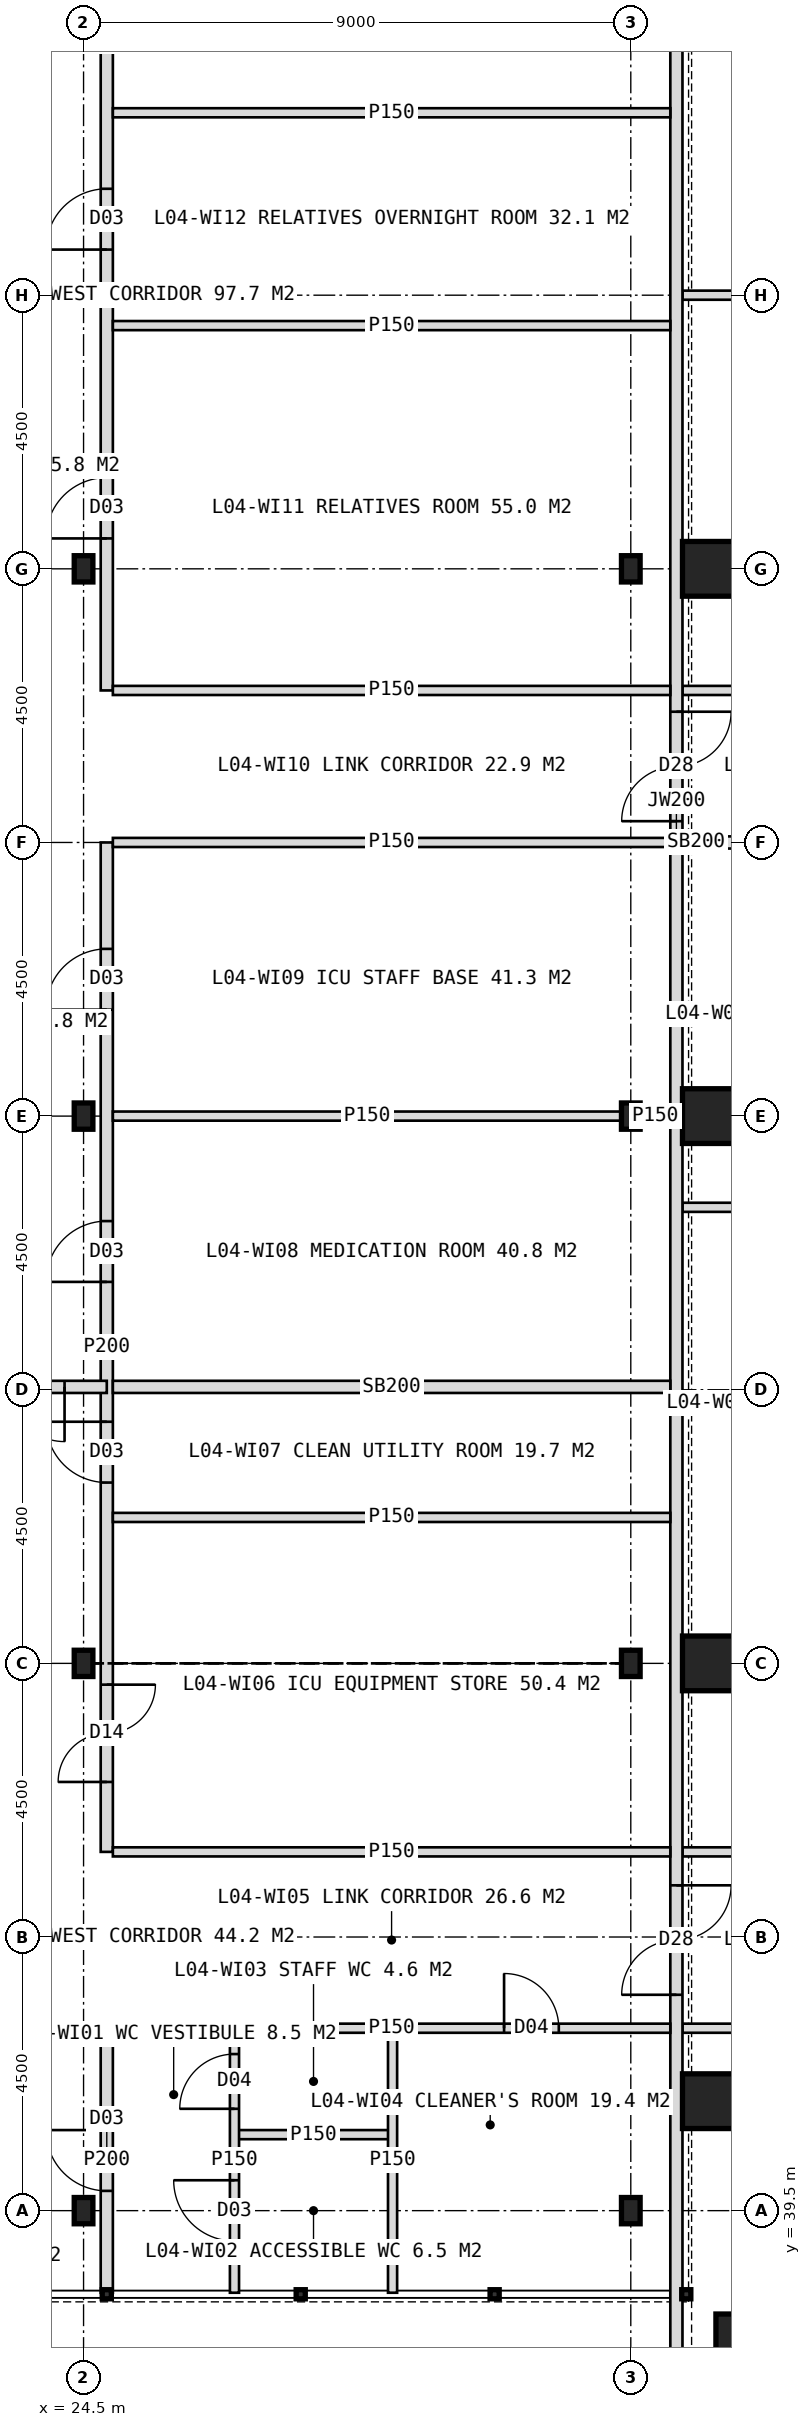
"""IFC4 building model, lengths in metres.
Left out: names, types, materials, properties, quantities, classifications, styles, units other than length and angle.
Written with IfcOpenShell. Run it as: python <this file> out.ifc"""

import sys

from ifc_helpers import new_model, si_unit, direction, frame, frame_2d, origin, origin_2d, place, context, subcontext, project, spatial, rectangle, hollow_rectangle, i_section, extrude, element, fill, save


model = new_model("IFC4")
c1 = context("Model", 3, precision=1e-05, world=origin(), true_north=direction((0.0, 1.0)))
c2 = subcontext(c1, "Body", "Model", "MODEL_VIEW")
j1 = project(units=[si_unit("LENGTHUNIT", "METRE"), si_unit("PLANEANGLEUNIT", "RADIAN")], contexts=[c1])
p1 = place(None, origin())
s1 = spatial("IfcSite", under=j1, at=p1, CompositionType="ELEMENT")
p2 = place(p1, origin())
s2 = spatial("IfcBuilding", under=s1, at=p2, CompositionType="ELEMENT")
p3 = place(p2, frame((0.0, 0.0, 21.0)))
s3 = spatial("IfcBuildingStorey", under=s2, at=p3, CompositionType="ELEMENT", Elevation=21.0)
for number, where, z_axis, x_axis in (
    (1, (34.8, 41.3, 0.0), (0.0, 0.0, 1.0), (1.0, 0.0, 0.0)),
    (2, (34.8, 48.5, 0.0), (0.0, 0.0, 1.0), (1.0, 0.0, 0.0)),
    (3, (34.8, 57.5, 0.0), (0.0, 0.0, 1.0), (1.0, 0.0, 0.0)),
    (4, (34.8, 66.5, 0.0), (0.0, 0.0, 1.0), (1.0, 0.0, 0.0)),
    (5, (35.35, 37.35, 0.0), (0.0, 0.0, 1.0), (1.0, 0.0, 0.0)),
):
    element("IfcColumn", number, at=place(p3, frame(where, z_axis=z_axis, x_axis=x_axis)), inside=s3, PredefinedType="COLUMN", context=c2, shape_type="SweptSolid", body=[
        extrude(hollow_rectangle(XDim=0.9, YDim=0.9, WallThickness=0.08, at=origin_2d()), origin(), (0.0, 0.0, 1.0), 5.0),
    ])
for number, where, z_axis, x_axis in (
    (6, (24.5, 39.5, 0.0), (0.0, 0.0, 1.0), (1.0, 0.0, 0.0)),
    (7, (24.5, 48.5, 0.0), (0.0, 0.0, 1.0), (1.0, 0.0, 0.0)),
    (8, (24.5, 57.5, 0.0), (0.0, 0.0, 1.0), (1.0, 0.0, 0.0)),
    (9, (24.5, 66.5, 0.0), (0.0, 0.0, 1.0), (1.0, 0.0, 0.0)),
    (10, (33.5, 39.5, 0.0), (0.0, 0.0, 1.0), (1.0, 0.0, 0.0)),
    (11, (33.5, 48.5, 0.0), (0.0, 0.0, 1.0), (1.0, 0.0, 0.0)),
    (12, (33.5, 57.5, 0.0), (0.0, 0.0, 1.0), (1.0, 0.0, 0.0)),
    (13, (33.5, 66.5, 0.0), (0.0, 0.0, 1.0), (1.0, 0.0, 0.0)),
):
    element("IfcColumn", number, at=place(p3, frame(where, z_axis=z_axis, x_axis=x_axis)), inside=s3, PredefinedType="COLUMN", context=c2, shape_type="SweptSolid", body=[
        extrude(i_section(OverallWidth=0.307, OverallDepth=0.432, WebThickness=0.021, FlangeThickness=0.04, FilletRadius=0.027, at=origin_2d()), origin(), (0.0, 0.0, 1.0), 5.0),
    ])
for number, where, z_axis, x_axis in (
    (14, (40.5, 42.5, 0.0), (0.0, 0.0, 1.0), (-1.0, 0.0, 0.0)),
    (15, (40.5, 45.4, 0.0), (0.0, 0.0, 1.0), (-1.0, 0.0, 0.0)),
    (16, (40.5, 56.0, 0.0), (0.0, 0.0, 1.0), (-1.0, 0.0, 0.0)),
):
    element("IfcWall", number, at=place(p3, frame(where, z_axis=z_axis, x_axis=x_axis)), inside=s3, PredefinedType="PARTITIONING", context=c2, shape_type="SweptSolid", body=[
        extrude(rectangle(XDim=6.15, YDim=0.15, at=frame_2d((3.075, 0.0))), origin(), (0.0, 0.0, 1.0), 4.7),
    ])
p4 = place(p3, frame((40.5, 62.0, 0.0), z_axis=(0.0, 0.0, 1.0), x_axis=(-1.0, 0.0, 0.0)))
e17 = element("IfcWall", 17, at=p4, inside=s3, PredefinedType="SOLIDWALL", context=c2, shape_type="SweptSolid", body=[
    extrude(rectangle(XDim=5.7, YDim=0.2, at=frame_2d((2.85, 0.0))), origin(), (0.0, 0.0, 1.0), 3.7),
])
p5 = place(p3, frame((34.8, 62.0, 0.0), z_axis=(0.0, 0.0, 1.0), x_axis=(-1.0, 0.0, 0.0)))
e18 = element("IfcWall", 18, at=p5, inside=s3, PredefinedType="SOLIDWALL", context=c2, shape_type="SweptSolid", body=[
    extrude(rectangle(XDim=0.45, YDim=0.2, at=frame_2d((0.225, 0.0))), origin(), (0.0, 0.0, 1.0), 4.7),
])
for number, where, z_axis, x_axis in (
    (19, (40.5, 64.5, 0.0), (0.0, 0.0, 1.0), (-1.0, 0.0, 0.0)),
    (20, (40.5, 71.0, 0.0), (0.0, 0.0, 1.0), (-1.0, 0.0, 0.0)),
):
    element("IfcWall", number, at=place(p3, frame(where, z_axis=z_axis, x_axis=x_axis)), inside=s3, PredefinedType="PARTITIONING", context=c2, shape_type="SweptSolid", body=[
        extrude(rectangle(XDim=6.15, YDim=0.15, at=frame_2d((3.075, 0.0))), origin(), (0.0, 0.0, 1.0), 4.7),
    ])
p6 = place(p3, frame((24.882, 38.15, 0.0), z_axis=(0.0, 0.0, 1.0), x_axis=(0.0, 1.0, 0.0)))
e21 = element("IfcWall", 21, at=p6, inside=s3, PredefinedType="PARTITIONING", context=c2, shape_type="SweptSolid", body=[
    extrude(rectangle(XDim=4.35, YDim=0.2, at=frame_2d((2.175, 0.0))), origin(), (0.0, 0.0, 1.0), 4.7),
])
p7 = place(p6, frame((1.675, 0.0, 0.0)))
e22 = element("IfcOpeningElement", 22, at=p7, cuts=e21, PredefinedType="OPENING", context=c2, shape_type="SweptSolid", body=[
    extrude(rectangle(XDim=1.0, YDim=2.1, at=frame_2d((0.5, 1.05))), frame((0.0, 0.11, 0.0), z_axis=(0.0, -1.0, 0.0), x_axis=(1.0, 0.0, 0.0)), (0.0, 0.0, 1.0), 0.22),
])
p8 = place(p3, frame((24.882, 45.4, 0.0), z_axis=(0.0, 0.0, 1.0), x_axis=(0.0, 1.0, 0.0)))
e23 = element("IfcWall", 23, at=p8, inside=s3, PredefinedType="PARTITIONING", context=c2, shape_type="SweptSolid", body=[
    extrude(rectangle(XDim=16.6, YDim=0.2, at=frame_2d((8.3, 0.0))), origin(), (0.0, 0.0, 1.0), 4.7),
])
p9 = place(p8, frame((1.15, 0.0, 0.0)))
e24 = element("IfcOpeningElement", 24, at=p9, cuts=e23, PredefinedType="OPENING", context=c2, shape_type="SweptSolid", body=[
    extrude(rectangle(XDim=1.6, YDim=2.2, at=frame_2d((0.8, 1.1))), frame((0.0, 0.11, 0.0), z_axis=(0.0, -1.0, 0.0), x_axis=(1.0, 0.0, 0.0)), (0.0, 0.0, 1.0), 0.22),
])
p10 = place(p8, frame((6.073, 0.0, 0.0)))
e25 = element("IfcOpeningElement", 25, at=p10, cuts=e23, PredefinedType="OPENING", context=c2, shape_type="SweptSolid", body=[
    extrude(rectangle(XDim=1.0, YDim=2.1, at=frame_2d((0.5, 1.05))), frame((0.0, 0.11, 0.0), z_axis=(0.0, -1.0, 0.0), x_axis=(1.0, 0.0, 0.0)), (0.0, 0.0, 1.0), 0.22),
])
p11 = place(p8, frame((9.374, 0.0, 0.0)))
e26 = element("IfcOpeningElement", 26, at=p11, cuts=e23, PredefinedType="OPENING", context=c2, shape_type="SweptSolid", body=[
    extrude(rectangle(XDim=1.0, YDim=2.1, at=frame_2d((0.5, 1.05))), frame((0.0, 0.11, 0.0), z_axis=(0.0, -1.0, 0.0), x_axis=(1.0, 0.0, 0.0)), (0.0, 0.0, 1.0), 0.22),
])
p12 = place(p8, frame((13.85, 0.0, 0.0)))
e27 = element("IfcOpeningElement", 27, at=p12, cuts=e23, PredefinedType="OPENING", context=c2, shape_type="SweptSolid", body=[
    extrude(rectangle(XDim=1.0, YDim=2.1, at=frame_2d((0.5, 1.05))), frame((0.0, 0.11, 0.0), z_axis=(0.0, -1.0, 0.0), x_axis=(1.0, 0.0, 0.0)), (0.0, 0.0, 1.0), 0.22),
])
p13 = place(p3, frame((24.882, 64.5, 0.0), z_axis=(0.0, 0.0, 1.0), x_axis=(0.0, 1.0, 0.0)))
e28 = element("IfcWall", 28, at=p13, inside=s3, PredefinedType="PARTITIONING", context=c2, shape_type="SweptSolid", body=[
    extrude(rectangle(XDim=21.35, YDim=0.2, at=frame_2d((10.675, 0.0))), origin(), (0.0, 0.0, 1.0), 4.7),
])
p14 = place(p13, frame((2.5, 0.0, 0.0)))
e29 = element("IfcOpeningElement", 29, at=p14, cuts=e28, PredefinedType="OPENING", context=c2, shape_type="SweptSolid", body=[
    extrude(rectangle(XDim=1.0, YDim=2.1, at=frame_2d((0.5, 1.05))), frame((0.0, 0.11, 0.0), z_axis=(0.0, -1.0, 0.0), x_axis=(1.0, 0.0, 0.0)), (0.0, 0.0, 1.0), 0.22),
])
p15 = place(p13, frame((7.25, 0.0, 0.0)))
e30 = element("IfcOpeningElement", 30, at=p15, cuts=e28, PredefinedType="OPENING", context=c2, shape_type="SweptSolid", body=[
    extrude(rectangle(XDim=1.0, YDim=2.1, at=frame_2d((0.5, 1.05))), frame((0.0, 0.11, 0.0), z_axis=(0.0, -1.0, 0.0), x_axis=(1.0, 0.0, 0.0)), (0.0, 0.0, 1.0), 0.22),
])
p16 = place(p13, frame((11.5, 0.0, 0.0)))
e31 = element("IfcOpeningElement", 31, at=p16, cuts=e28, PredefinedType="OPENING", context=c2, shape_type="SweptSolid", body=[
    extrude(rectangle(XDim=1.0, YDim=2.1, at=frame_2d((0.5, 1.05))), frame((0.0, 0.11, 0.0), z_axis=(0.0, -1.0, 0.0), x_axis=(1.0, 0.0, 0.0)), (0.0, 0.0, 1.0), 0.22),
])
p17 = place(p13, frame((15.75, 0.0, 0.0)))
e32 = element("IfcOpeningElement", 32, at=p17, cuts=e28, PredefinedType="OPENING", context=c2, shape_type="SweptSolid", body=[
    extrude(rectangle(XDim=1.0, YDim=2.1, at=frame_2d((0.5, 1.05))), frame((0.0, 0.11, 0.0), z_axis=(0.0, -1.0, 0.0), x_axis=(1.0, 0.0, 0.0)), (0.0, 0.0, 1.0), 0.22),
])
p18 = place(p13, frame((18.675, 0.0, 0.0)))
e33 = element("IfcOpeningElement", 33, at=p18, cuts=e28, PredefinedType="OPENING", context=c2, shape_type="SweptSolid", body=[
    extrude(rectangle(XDim=1.0, YDim=2.1, at=frame_2d((0.5, 1.05))), frame((0.0, 0.11, 0.0), z_axis=(0.0, -1.0, 0.0), x_axis=(1.0, 0.0, 0.0)), (0.0, 0.0, 1.0), 0.22),
])
p19 = place(p3, frame((21.693, 53.047, 0.0), z_axis=(0.0, 0.0, 1.0), x_axis=(1.0, 0.0, 0.0)))
e34 = element("IfcWall", 34, at=p19, inside=s3, PredefinedType="SOLIDWALL", context=c2, shape_type="SweptSolid", body=[
    extrude(rectangle(XDim=3.189, YDim=0.2, at=frame_2d((1.594, 0.0))), origin(), (0.0, 0.0, 1.0), 4.7),
])
p20 = place(p19, frame((0.695, 0.0, 0.0)))
e35 = element("IfcOpeningElement", 35, at=p20, cuts=e34, PredefinedType="OPENING", context=c2, shape_type="SweptSolid", body=[
    extrude(rectangle(XDim=1.8, YDim=2.2, at=frame_2d((0.9, 1.1))), frame((0.0, 0.11, 0.0), z_axis=(0.0, -1.0, 0.0), x_axis=(1.0, 0.0, 0.0)), (0.0, 0.0, 1.0), 0.22),
])
p21 = place(p3, frame((34.25, 36.8, 0.0), z_axis=(0.0, 0.0, 1.0), x_axis=(0.0, 1.0, 0.0)))
e36 = element("IfcWall", 36, at=p21, inside=s3, PredefinedType="SOLIDWALL", context=c2, shape_type="SweptSolid", body=[
    extrude(rectangle(XDim=50.4, YDim=0.2, at=frame_2d((25.2, 0.0))), origin(), (0.0, 0.0, 1.0), 4.7),
])
p22 = place(p21, frame((6.25, 0.0, 0.0)))
e37 = element("IfcOpeningElement", 37, at=p22, cuts=e36, PredefinedType="OPENING", context=c2, shape_type="SweptSolid", body=[
    extrude(rectangle(XDim=1.8, YDim=2.2, at=frame_2d((0.9, 1.1))), frame((0.0, 0.11, 0.0), z_axis=(0.0, -1.0, 0.0), x_axis=(1.0, 0.0, 0.0)), (0.0, 0.0, 1.0), 0.22),
])
p23 = place(p21, frame((25.55, 0.0, 0.0)))
e38 = element("IfcOpeningElement", 38, at=p23, cuts=e36, PredefinedType="OPENING", context=c2, shape_type="SweptSolid", body=[
    extrude(rectangle(XDim=1.8, YDim=2.2, at=frame_2d((0.9, 1.1))), frame((0.0, 0.11, 0.0), z_axis=(0.0, -1.0, 0.0), x_axis=(1.0, 0.0, 0.0)), (0.0, 0.0, 1.0), 0.22),
])
p24 = place(p3, frame((26.982, 40.75, 0.0), z_axis=(0.0, 0.0, 1.0), x_axis=(1.0, 0.0, 0.0)))
e39 = element("IfcWall", 39, at=p24, inside=s3, PredefinedType="PARTITIONING", context=c2, shape_type="SweptSolid", body=[
    extrude(rectangle(XDim=2.6, YDim=0.15, at=frame_2d((1.3, 0.0))), origin(), (0.0, 0.0, 1.0), 4.7),
])
p25 = place(p3, frame((24.982, 42.5, 0.0), z_axis=(0.0, 0.0, 1.0), x_axis=(1.0, 0.0, 0.0)))
e40 = element("IfcWall", 40, at=p25, inside=s3, PredefinedType="PARTITIONING", context=c2, shape_type="SweptSolid", body=[
    extrude(rectangle(XDim=9.168, YDim=0.15, at=frame_2d((4.584, 0.0))), origin(), (0.0, 0.0, 1.0), 4.7),
])
p26 = place(p25, frame((6.434, 0.0, 0.0)))
e41 = element("IfcOpeningElement", 41, at=p26, cuts=e40, PredefinedType="OPENING", context=c2, shape_type="SweptSolid", body=[
    extrude(rectangle(XDim=0.9, YDim=2.1, at=frame_2d((0.45, 1.05))), frame((0.0, 0.085, 0.0), z_axis=(0.0, -1.0, 0.0), x_axis=(1.0, 0.0, 0.0)), (0.0, 0.0, 1.0), 0.17),
])
for number, where, z_axis, x_axis in (
    (42, (24.982, 45.4, 0.0), (0.0, 0.0, 1.0), (1.0, 0.0, 0.0)),
    (43, (24.982, 50.9, 0.0), (0.0, 0.0, 1.0), (1.0, 0.0, 0.0)),
):
    element("IfcWall", number, at=place(p3, frame(where, z_axis=z_axis, x_axis=x_axis)), inside=s3, PredefinedType="PARTITIONING", context=c2, shape_type="SweptSolid", body=[
        extrude(rectangle(XDim=9.168, YDim=0.15, at=frame_2d((4.584, 0.0))), origin(), (0.0, 0.0, 1.0), 4.7),
    ])
p27 = place(p3, frame((24.982, 53.047, 0.0), z_axis=(0.0, 0.0, 1.0), x_axis=(1.0, 0.0, 0.0)))
e44 = element("IfcWall", 44, at=p27, inside=s3, PredefinedType="SOLIDWALL", context=c2, shape_type="SweptSolid", body=[
    extrude(rectangle(XDim=9.168, YDim=0.2, at=frame_2d((4.584, 0.0))), origin(), (0.0, 0.0, 1.0), 4.7),
])
p28 = place(p3, frame((24.982, 57.5, 0.0), z_axis=(0.0, 0.0, 1.0), x_axis=(1.0, 0.0, 0.0)))
e45 = element("IfcWall", 45, at=p28, inside=s3, PredefinedType="PARTITIONING", context=c2, shape_type="SweptSolid", body=[
    extrude(rectangle(XDim=8.365, YDim=0.15, at=frame_2d((4.182, 0.0))), origin(), (0.0, 0.0, 1.0), 3.7),
])
p29 = place(p3, frame((33.654, 57.5, 0.0), z_axis=(0.0, 0.0, 1.0), x_axis=(1.0, 0.0, 0.0)))
e46 = element("IfcWall", 46, at=p29, inside=s3, PredefinedType="PARTITIONING", context=c2, shape_type="SweptSolid", body=[
    extrude(rectangle(XDim=0.496, YDim=0.15, at=frame_2d((0.248, 0.0))), origin(), (0.0, 0.0, 1.0), 4.7),
])
for number, where, z_axis, x_axis in (
    (47, (24.982, 62.0, 0.0), (0.0, 0.0, 1.0), (1.0, 0.0, 0.0)),
    (48, (24.982, 64.5, 0.0), (0.0, 0.0, 1.0), (1.0, 0.0, 0.0)),
    (49, (24.982, 70.5, 0.0), (0.0, 0.0, 1.0), (1.0, 0.0, 0.0)),
    (50, (24.982, 74.0, 0.0), (0.0, 0.0, 1.0), (1.0, 0.0, 0.0)),
):
    element("IfcWall", number, at=place(p3, frame(where, z_axis=z_axis, x_axis=x_axis)), inside=s3, PredefinedType="PARTITIONING", context=c2, shape_type="SweptSolid", body=[
        extrude(rectangle(XDim=9.168, YDim=0.15, at=frame_2d((4.584, 0.0))), origin(), (0.0, 0.0, 1.0), 4.7),
    ])
p30 = place(p3, frame((26.982, 38.15, 0.0), z_axis=(0.0, 0.0, 1.0), x_axis=(0.0, 1.0, 0.0)))
e51 = element("IfcWall", 51, at=p30, inside=s3, PredefinedType="PARTITIONING", context=c2, shape_type="SweptSolid", body=[
    extrude(rectangle(XDim=4.35, YDim=0.15, at=frame_2d((2.175, 0.0))), origin(), (0.0, 0.0, 1.0), 4.7),
])
p31 = place(p30, frame((0.85, 0.0, 0.0)))
e52 = element("IfcOpeningElement", 52, at=p31, cuts=e51, PredefinedType="OPENING", context=c2, shape_type="SweptSolid", body=[
    extrude(rectangle(XDim=1.0, YDim=2.1, at=frame_2d((0.5, 1.05))), frame((0.0, 0.085, 0.0), z_axis=(0.0, -1.0, 0.0), x_axis=(1.0, 0.0, 0.0)), (0.0, 0.0, 1.0), 0.17),
])
p32 = place(p30, frame((3.025, 0.0, 0.0)))
e53 = element("IfcOpeningElement", 53, at=p32, cuts=e51, PredefinedType="OPENING", context=c2, shape_type="SweptSolid", body=[
    extrude(rectangle(XDim=0.9, YDim=2.1, at=frame_2d((0.45, 1.05))), frame((0.0, 0.085, 0.0), z_axis=(0.0, -1.0, 0.0), x_axis=(1.0, 0.0, 0.0)), (0.0, 0.0, 1.0), 0.17),
])
p33 = place(p3, frame((29.582, 38.15, 0.0), z_axis=(0.0, 0.0, 1.0), x_axis=(0.0, 1.0, 0.0)))
e54 = element("IfcWall", 54, at=p33, inside=s3, PredefinedType="PARTITIONING", context=c2, shape_type="SweptSolid", body=[
    extrude(rectangle(XDim=4.35, YDim=0.15, at=frame_2d((2.175, 0.0))), origin(), (0.0, 0.0, 1.0), 4.7),
])
p34 = place(p20, origin())
e55 = element("IfcDoor", 55, at=p34, inside=s3, OperationType="DOUBLE_DOOR_DOUBLE_SWING", PredefinedType="DOOR", context=c2, shape_type="SweptSolid", body=[
    extrude(rectangle(XDim=1.8, YDim=2.2, at=frame_2d((0.9, 1.1))), frame((0.0, 0.025, 0.0), z_axis=(0.0, -1.0, 0.0), x_axis=(1.0, 0.0, 0.0)), (0.0, 0.0, 1.0), 0.05),
])
fill(e35, e55)
p35 = place(p22, origin())
e56 = element("IfcDoor", 56, at=p35, inside=s3, OperationType="DOUBLE_DOOR_SINGLE_SWING", PredefinedType="DOOR", context=c2, shape_type="SweptSolid", body=[
    extrude(rectangle(XDim=1.8, YDim=2.2, at=frame_2d((0.9, 1.1))), frame((0.0, 0.025, 0.0), z_axis=(0.0, -1.0, 0.0), x_axis=(1.0, 0.0, 0.0)), (0.0, 0.0, 1.0), 0.05),
])
fill(e37, e56)
p36 = place(p23, origin())
e57 = element("IfcDoor", 57, at=p36, inside=s3, OperationType="DOUBLE_DOOR_SINGLE_SWING", PredefinedType="DOOR", context=c2, shape_type="SweptSolid", body=[
    extrude(rectangle(XDim=1.8, YDim=2.2, at=frame_2d((0.9, 1.1))), frame((0.0, 0.025, 0.0), z_axis=(0.0, -1.0, 0.0), x_axis=(1.0, 0.0, 0.0)), (0.0, 0.0, 1.0), 0.05),
])
fill(e38, e57)
p37 = place(p7, origin())
e58 = element("IfcDoor", 58, at=p37, inside=s3, OperationType="SINGLE_SWING_RIGHT", PredefinedType="DOOR", context=c2, shape_type="SweptSolid", body=[
    extrude(rectangle(XDim=1.0, YDim=2.1, at=frame_2d((0.5, 1.05))), frame((0.0, 0.025, 0.0), z_axis=(0.0, -1.0, 0.0), x_axis=(1.0, 0.0, 0.0)), (0.0, 0.0, 1.0), 0.05),
])
fill(e22, e58)
p38 = place(p31, origin())
e59 = element("IfcDoor", 59, at=p38, inside=s3, OperationType="SINGLE_SWING_RIGHT", PredefinedType="DOOR", context=c2, shape_type="SweptSolid", body=[
    extrude(rectangle(XDim=1.0, YDim=2.1, at=frame_2d((0.5, 1.05))), frame((0.0, 0.025, 0.0), z_axis=(0.0, -1.0, 0.0), x_axis=(1.0, 0.0, 0.0)), (0.0, 0.0, 1.0), 0.05),
])
fill(e52, e59)
p39 = place(p32, origin())
e60 = element("IfcDoor", 60, at=p39, inside=s3, OperationType="SINGLE_SWING_LEFT", PredefinedType="DOOR", context=c2, shape_type="SweptSolid", body=[
    extrude(rectangle(XDim=0.9, YDim=2.1, at=frame_2d((0.45, 1.05))), frame((0.0, 0.025, 0.0), z_axis=(0.0, -1.0, 0.0), x_axis=(1.0, 0.0, 0.0)), (0.0, 0.0, 1.0), 0.05),
])
fill(e53, e60)
p40 = place(p26, origin())
e61 = element("IfcDoor", 61, at=p40, inside=s3, OperationType="SINGLE_SWING_LEFT", PredefinedType="DOOR", context=c2, shape_type="SweptSolid", body=[
    extrude(rectangle(XDim=0.9, YDim=2.1, at=frame_2d((0.45, 1.05))), frame((0.0, 0.025, 0.0), z_axis=(0.0, -1.0, 0.0), x_axis=(1.0, 0.0, 0.0)), (0.0, 0.0, 1.0), 0.05),
])
fill(e41, e61)
p41 = place(p9, origin())
e62 = element("IfcDoor", 62, at=p41, inside=s3, OperationType="DOUBLE_DOOR_DOUBLE_SWING", PredefinedType="DOOR", context=c2, shape_type="SweptSolid", body=[
    extrude(rectangle(XDim=1.6, YDim=2.2, at=frame_2d((0.8, 1.1))), frame((0.0, 0.025, 0.0), z_axis=(0.0, -1.0, 0.0), x_axis=(1.0, 0.0, 0.0)), (0.0, 0.0, 1.0), 0.05),
])
fill(e24, e62)
p42 = place(p10, origin())
e63 = element("IfcDoor", 63, at=p42, inside=s3, OperationType="SINGLE_SWING_RIGHT", PredefinedType="DOOR", context=c2, shape_type="SweptSolid", body=[
    extrude(rectangle(XDim=1.0, YDim=2.1, at=frame_2d((0.5, 1.05))), frame((0.0, 0.025, 0.0), z_axis=(0.0, -1.0, 0.0), x_axis=(1.0, 0.0, 0.0)), (0.0, 0.0, 1.0), 0.05),
])
fill(e25, e63)
p43 = place(p11, origin())
e64 = element("IfcDoor", 64, at=p43, inside=s3, OperationType="SINGLE_SWING_LEFT", PredefinedType="DOOR", context=c2, shape_type="SweptSolid", body=[
    extrude(rectangle(XDim=1.0, YDim=2.1, at=frame_2d((0.5, 1.05))), frame((0.0, 0.025, 0.0), z_axis=(0.0, -1.0, 0.0), x_axis=(1.0, 0.0, 0.0)), (0.0, 0.0, 1.0), 0.05),
])
fill(e26, e64)
p44 = place(p12, origin())
e65 = element("IfcDoor", 65, at=p44, inside=s3, OperationType="SINGLE_SWING_LEFT", PredefinedType="DOOR", context=c2, shape_type="SweptSolid", body=[
    extrude(rectangle(XDim=1.0, YDim=2.1, at=frame_2d((0.5, 1.05))), frame((0.0, 0.025, 0.0), z_axis=(0.0, -1.0, 0.0), x_axis=(1.0, 0.0, 0.0)), (0.0, 0.0, 1.0), 0.05),
])
fill(e27, e65)
p45 = place(p14, origin())
e66 = element("IfcDoor", 66, at=p45, inside=s3, OperationType="SINGLE_SWING_LEFT", PredefinedType="DOOR", context=c2, shape_type="SweptSolid", body=[
    extrude(rectangle(XDim=1.0, YDim=2.1, at=frame_2d((0.5, 1.05))), frame((0.0, 0.025, 0.0), z_axis=(0.0, -1.0, 0.0), x_axis=(1.0, 0.0, 0.0)), (0.0, 0.0, 1.0), 0.05),
])
fill(e29, e66)
p46 = place(p15, origin())
e67 = element("IfcDoor", 67, at=p46, inside=s3, OperationType="SINGLE_SWING_LEFT", PredefinedType="DOOR", context=c2, shape_type="SweptSolid", body=[
    extrude(rectangle(XDim=1.0, YDim=2.1, at=frame_2d((0.5, 1.05))), frame((0.0, 0.025, 0.0), z_axis=(0.0, -1.0, 0.0), x_axis=(1.0, 0.0, 0.0)), (0.0, 0.0, 1.0), 0.05),
])
fill(e30, e67)
save(model, sys.argv[1])
